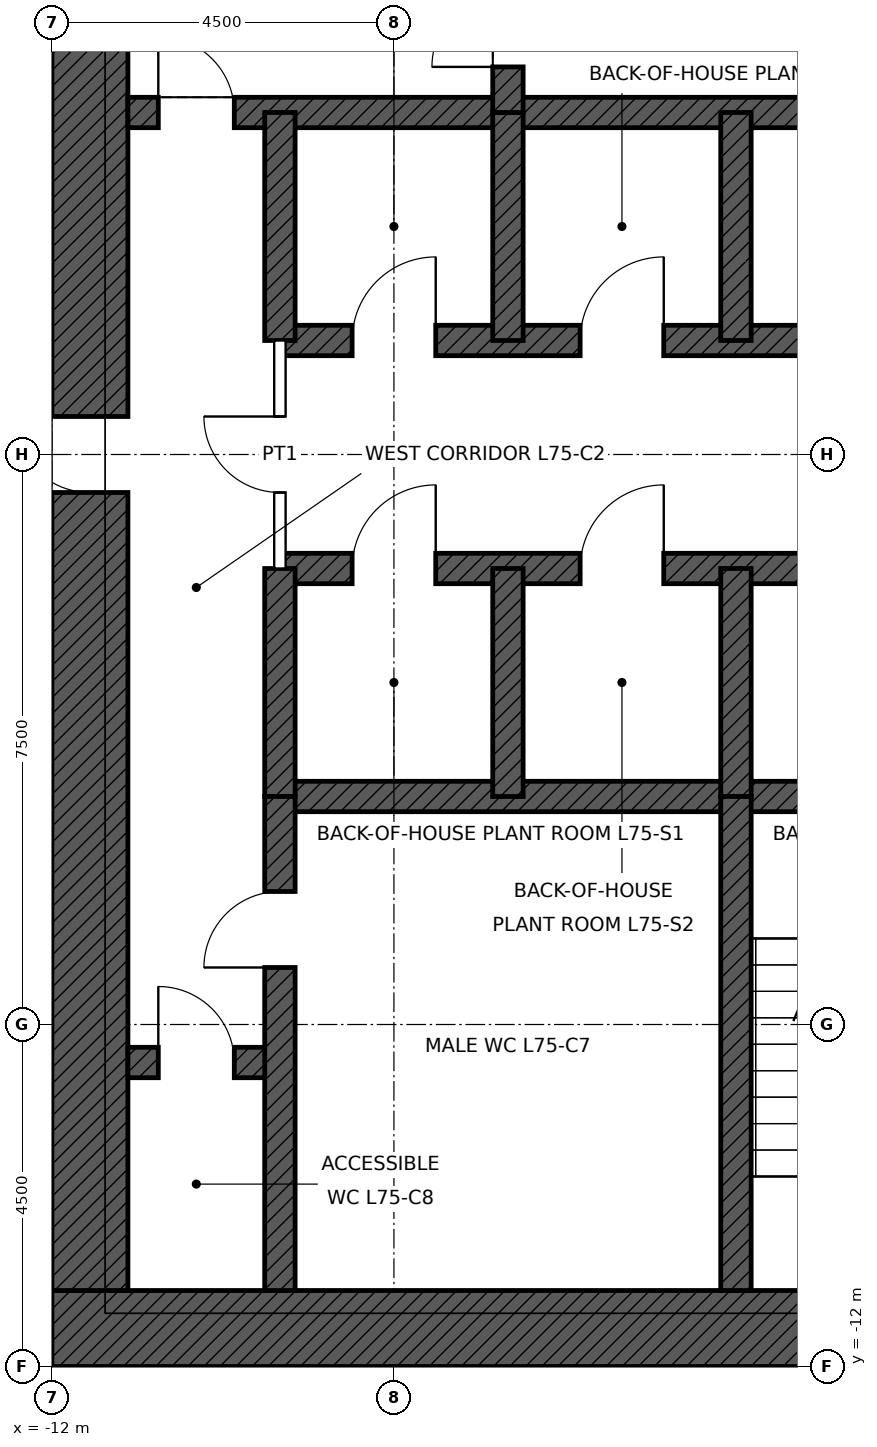
"""IFC4 building model, lengths in metres.
Left out: names, types, materials, properties, quantities, classifications, styles, units other than length and angle.
Written with IfcOpenShell. Run it as: python <this file> out.ifc"""

import sys

from ifc_helpers import new_model, si_unit, direction, frame, frame_2d, origin, place, context, subcontext, project, spatial, rectangle, extrude, element, fill, save


model = new_model("IFC4")
c1 = context("Model", 3, precision=1e-05, world=origin(), true_north=direction((0.0, 1.0)))
c2 = subcontext(c1, "Body", "Model", "MODEL_VIEW")
j1 = project(units=[si_unit("LENGTHUNIT", "METRE"), si_unit("PLANEANGLEUNIT", "RADIAN")], contexts=[c1])
p1 = place(None, origin())
s1 = spatial("IfcSite", under=j1, at=p1, CompositionType="ELEMENT")
p2 = place(p1, origin())
s2 = spatial("IfcBuilding", under=s1, at=p2, CompositionType="ELEMENT")
p3 = place(p2, frame((0.0, 0.0, 335.9)))
s3 = spatial("IfcBuildingStorey", under=s2, at=p3, CompositionType="ELEMENT", Elevation=335.9)
p4 = place(p3, frame((12.0, -11.5, 0.0), z_axis=(0.0, 0.0, 1.0), x_axis=(-1.0, 0.0, 0.0)))
e1 = element("IfcWall", 1, at=p4, inside=s3, PredefinedType="SHEAR", context=c2, shape_type="SweptSolid", body=[
    extrude(rectangle(XDim=24.0, YDim=1.0, at=frame_2d((12.0, 0.0))), origin(), (0.0, 0.0, 1.0), 6.0),
])
p5 = place(p4, frame((11.5, 0.0, 0.0)))
e2 = element("IfcOpeningElement", 2, at=p5, cuts=e1, PredefinedType="OPENING", context=c2, shape_type="SweptSolid", body=[
    extrude(rectangle(XDim=1.0, YDim=2.1, at=frame_2d((0.5, 1.05))), frame((0.0, 0.51, 0.0), z_axis=(0.0, -1.0, 0.0), x_axis=(1.0, 0.0, 0.0)), (0.0, 0.0, 1.0), 1.02),
])
p6 = place(p4, frame((1.0, 0.0, 0.0)))
e3 = element("IfcOpeningElement", 3, at=p6, cuts=e1, PredefinedType="OPENING", context=c2, shape_type="SweptSolid", body=[
    extrude(rectangle(XDim=1.0, YDim=2.4, at=frame_2d((0.5, 1.2))), frame((0.0, 0.51, 0.0), z_axis=(0.0, -1.0, 0.0), x_axis=(1.0, 0.0, 0.0)), (0.0, 0.0, 1.0), 1.02),
])
p7 = place(p3, frame((-11.5, -11.0, 0.0), z_axis=(0.0, 0.0, 1.0), x_axis=(0.0, 1.0, 0.0)))
e4 = element("IfcWall", 4, at=p7, inside=s3, PredefinedType="SHEAR", context=c2, shape_type="SweptSolid", body=[
    extrude(rectangle(XDim=22.0, YDim=1.0, at=frame_2d((11.0, 0.0))), origin(), (0.0, 0.0, 1.0), 6.0),
])
p8 = place(p7, frame((10.5, 0.0, 0.0)))
e5 = element("IfcOpeningElement", 5, at=p8, cuts=e4, PredefinedType="OPENING", context=c2, shape_type="SweptSolid", body=[
    extrude(rectangle(XDim=1.0, YDim=2.4, at=frame_2d((0.5, 1.2))), frame((0.0, 0.51, 0.0), z_axis=(0.0, -1.0, 0.0), x_axis=(1.0, 0.0, 0.0)), (0.0, 0.0, 1.0), 1.02),
])
p9 = place(p3, frame((-11.0, 4.5, 0.0), z_axis=(0.0, 0.0, 1.0), x_axis=(1.0, 0.0, 0.0)))
e6 = element("IfcWall", 6, at=p9, inside=s3, PredefinedType="SHEAR", context=c2, shape_type="SweptSolid", body=[
    extrude(rectangle(XDim=22.0, YDim=0.4, at=frame_2d((11.0, 0.0))), origin(), (0.0, 0.0, 1.0), 6.0),
])
p10 = place(p9, frame((0.4, 0.0, 0.0)))
e7 = element("IfcOpeningElement", 7, at=p10, cuts=e6, PredefinedType="OPENING", context=c2, shape_type="SweptSolid", body=[
    extrude(rectangle(XDim=1.0, YDim=2.1, at=frame_2d((0.5, 1.05))), frame((0.0, 0.21, 0.0), z_axis=(0.0, -1.0, 0.0), x_axis=(1.0, 0.0, 0.0)), (0.0, 0.0, 1.0), 0.42),
])
p11 = place(p9, frame((20.6, 0.0, 0.0)))
e8 = element("IfcOpeningElement", 8, at=p11, cuts=e6, PredefinedType="OPENING", context=c2, shape_type="SweptSolid", body=[
    extrude(rectangle(XDim=1.0, YDim=2.1, at=frame_2d((0.5, 1.05))), frame((0.0, 0.21, 0.0), z_axis=(0.0, -1.0, 0.0), x_axis=(1.0, 0.0, 0.0)), (0.0, 0.0, 1.0), 0.42),
])
p12 = place(p3, frame((-9.0, 1.5, 0.0), z_axis=(0.0, 0.0, 1.0), x_axis=(1.0, 0.0, 0.0)))
e9 = element("IfcWall", 9, at=p12, inside=s3, PredefinedType="SHEAR", context=c2, shape_type="SweptSolid", body=[
    extrude(rectangle(XDim=18.0, YDim=0.4, at=frame_2d((9.0, 0.0))), origin(), (0.0, 0.0, 1.0), 6.0),
])
p13 = place(p12, frame((0.95, 0.0, 0.0)))
e10 = element("IfcOpeningElement", 10, at=p13, cuts=e9, PredefinedType="OPENING", context=c2, shape_type="SweptSolid", body=[
    extrude(rectangle(XDim=1.1, YDim=2.1, at=frame_2d((0.55, 1.05))), frame((0.0, 0.21, 0.0), z_axis=(0.0, -1.0, 0.0), x_axis=(1.0, 0.0, 0.0)), (0.0, 0.0, 1.0), 0.42),
])
p14 = place(p12, frame((3.95, 0.0, 0.0)))
e11 = element("IfcOpeningElement", 11, at=p14, cuts=e9, PredefinedType="OPENING", context=c2, shape_type="SweptSolid", body=[
    extrude(rectangle(XDim=1.1, YDim=2.1, at=frame_2d((0.55, 1.05))), frame((0.0, 0.21, 0.0), z_axis=(0.0, -1.0, 0.0), x_axis=(1.0, 0.0, 0.0)), (0.0, 0.0, 1.0), 0.42),
])
p15 = place(p12, frame((6.95, 0.0, 0.0)))
e12 = element("IfcOpeningElement", 12, at=p15, cuts=e9, PredefinedType="OPENING", context=c2, shape_type="SweptSolid", body=[
    extrude(rectangle(XDim=1.1, YDim=2.1, at=frame_2d((0.55, 1.05))), frame((0.0, 0.21, 0.0), z_axis=(0.0, -1.0, 0.0), x_axis=(1.0, 0.0, 0.0)), (0.0, 0.0, 1.0), 0.42),
])
p16 = place(p12, frame((9.95, 0.0, 0.0)))
e13 = element("IfcOpeningElement", 13, at=p16, cuts=e9, PredefinedType="OPENING", context=c2, shape_type="SweptSolid", body=[
    extrude(rectangle(XDim=1.1, YDim=2.1, at=frame_2d((0.55, 1.05))), frame((0.0, 0.21, 0.0), z_axis=(0.0, -1.0, 0.0), x_axis=(1.0, 0.0, 0.0)), (0.0, 0.0, 1.0), 0.42),
])
p17 = place(p12, frame((12.95, 0.0, 0.0)))
e14 = element("IfcOpeningElement", 14, at=p17, cuts=e9, PredefinedType="OPENING", context=c2, shape_type="SweptSolid", body=[
    extrude(rectangle(XDim=1.1, YDim=2.1, at=frame_2d((0.55, 1.05))), frame((0.0, 0.21, 0.0), z_axis=(0.0, -1.0, 0.0), x_axis=(1.0, 0.0, 0.0)), (0.0, 0.0, 1.0), 0.42),
])
p18 = place(p12, frame((15.95, 0.0, 0.0)))
e15 = element("IfcOpeningElement", 15, at=p18, cuts=e9, PredefinedType="OPENING", context=c2, shape_type="SweptSolid", body=[
    extrude(rectangle(XDim=1.1, YDim=2.1, at=frame_2d((0.55, 1.05))), frame((0.0, 0.21, 0.0), z_axis=(0.0, -1.0, 0.0), x_axis=(1.0, 0.0, 0.0)), (0.0, 0.0, 1.0), 0.42),
])
p19 = place(p3, frame((-9.0, -1.5, 0.0), z_axis=(0.0, 0.0, 1.0), x_axis=(1.0, 0.0, 0.0)))
e16 = element("IfcWall", 16, at=p19, inside=s3, PredefinedType="SHEAR", context=c2, shape_type="SweptSolid", body=[
    extrude(rectangle(XDim=18.0, YDim=0.4, at=frame_2d((9.0, 0.0))), origin(), (0.0, 0.0, 1.0), 6.0),
])
p20 = place(p19, frame((0.95, 0.0, 0.0)))
e17 = element("IfcOpeningElement", 17, at=p20, cuts=e16, PredefinedType="OPENING", context=c2, shape_type="SweptSolid", body=[
    extrude(rectangle(XDim=1.1, YDim=2.1, at=frame_2d((0.55, 1.05))), frame((0.0, 0.21, 0.0), z_axis=(0.0, -1.0, 0.0), x_axis=(1.0, 0.0, 0.0)), (0.0, 0.0, 1.0), 0.42),
])
p21 = place(p19, frame((3.95, 0.0, 0.0)))
e18 = element("IfcOpeningElement", 18, at=p21, cuts=e16, PredefinedType="OPENING", context=c2, shape_type="SweptSolid", body=[
    extrude(rectangle(XDim=1.1, YDim=2.1, at=frame_2d((0.55, 1.05))), frame((0.0, 0.21, 0.0), z_axis=(0.0, -1.0, 0.0), x_axis=(1.0, 0.0, 0.0)), (0.0, 0.0, 1.0), 0.42),
])
p22 = place(p19, frame((6.95, 0.0, 0.0)))
e19 = element("IfcOpeningElement", 19, at=p22, cuts=e16, PredefinedType="OPENING", context=c2, shape_type="SweptSolid", body=[
    extrude(rectangle(XDim=1.1, YDim=2.1, at=frame_2d((0.55, 1.05))), frame((0.0, 0.21, 0.0), z_axis=(0.0, -1.0, 0.0), x_axis=(1.0, 0.0, 0.0)), (0.0, 0.0, 1.0), 0.42),
])
p23 = place(p3, frame((-9.0, -4.5, 0.0), z_axis=(0.0, 0.0, 1.0), x_axis=(1.0, 0.0, 0.0)))
e20 = element("IfcWall", 20, at=p23, inside=s3, PredefinedType="SHEAR", context=c2, shape_type="SweptSolid", body=[
    extrude(rectangle(XDim=18.0, YDim=0.4, at=frame_2d((9.0, 0.0))), origin(), (0.0, 0.0, 1.0), 6.0),
])
p24 = place(p3, frame((-11.0, -8.0, 0.0), z_axis=(0.0, 0.0, 1.0), x_axis=(1.0, 0.0, 0.0)))
e21 = element("IfcWall", 21, at=p24, inside=s3, PredefinedType="SHEAR", context=c2, shape_type="SweptSolid", body=[
    extrude(rectangle(XDim=2.0, YDim=0.4, at=frame_2d((1.0, 0.0))), origin(), (0.0, 0.0, 1.0), 6.0),
])
p25 = place(p24, frame((0.4, 0.0, 0.0)))
e22 = element("IfcOpeningElement", 22, at=p25, cuts=e21, PredefinedType="OPENING", context=c2, shape_type="SweptSolid", body=[
    extrude(rectangle(XDim=1.0, YDim=2.1, at=frame_2d((0.5, 1.05))), frame((0.0, 0.21, 0.0), z_axis=(0.0, -1.0, 0.0), x_axis=(1.0, 0.0, 0.0)), (0.0, 0.0, 1.0), 0.42),
])
for number, where, z_axis, x_axis in (
    (23, (-9.0, 1.5, 0.0), (0.0, 0.0, 1.0), (0.0, 1.0, 0.0)),
    (24, (-9.0, -4.5, 0.0), (0.0, 0.0, 1.0), (0.0, 1.0, 0.0)),
    (25, (-6.0, 1.5, 0.0), (0.0, 0.0, 1.0), (0.0, 1.0, 0.0)),
    (26, (-3.0, 1.5, 0.0), (0.0, 0.0, 1.0), (0.0, 1.0, 0.0)),
    (27, (-6.0, -4.5, 0.0), (0.0, 0.0, 1.0), (0.0, 1.0, 0.0)),
    (28, (-3.0, -4.5, 0.0), (0.0, 0.0, 1.0), (0.0, 1.0, 0.0)),
):
    element("IfcWall", number, at=place(p3, frame(where, z_axis=z_axis, x_axis=x_axis)), inside=s3, PredefinedType="SHEAR", context=c2, shape_type="SweptSolid", body=[
        extrude(rectangle(XDim=3.0, YDim=0.4, at=frame_2d((1.5, 0.0))), origin(), (0.0, 0.0, 1.0), 6.0),
    ])
p26 = place(p3, frame((-6.0, 4.5, 0.0), z_axis=(0.0, 0.0, 1.0), x_axis=(0.0, 1.0, 0.0)))
e29 = element("IfcWall", 29, at=p26, inside=s3, PredefinedType="SHEAR", context=c2, shape_type="SweptSolid", body=[
    extrude(rectangle(XDim=6.5, YDim=0.4, at=frame_2d((3.25, 0.0))), origin(), (0.0, 0.0, 1.0), 6.0),
])
p27 = place(p26, frame((0.6, 0.0, 0.0)))
e30 = element("IfcOpeningElement", 30, at=p27, cuts=e29, PredefinedType="OPENING", context=c2, shape_type="SweptSolid", body=[
    extrude(rectangle(XDim=1.0, YDim=2.1, at=frame_2d((0.5, 1.05))), frame((0.0, 0.21, 0.0), z_axis=(0.0, -1.0, 0.0), x_axis=(1.0, 0.0, 0.0)), (0.0, 0.0, 1.0), 0.42),
])
p28 = place(p3, frame((-9.0, -11.0, 0.0), z_axis=(0.0, 0.0, 1.0), x_axis=(0.0, 1.0, 0.0)))
e31 = element("IfcWall", 31, at=p28, inside=s3, PredefinedType="SHEAR", context=c2, shape_type="SweptSolid", body=[
    extrude(rectangle(XDim=6.5, YDim=0.4, at=frame_2d((3.25, 0.0))), origin(), (0.0, 0.0, 1.0), 6.0),
])
p29 = place(p28, frame((4.25, 0.0, 0.0)))
e32 = element("IfcOpeningElement", 32, at=p29, cuts=e31, PredefinedType="OPENING", context=c2, shape_type="SweptSolid", body=[
    extrude(rectangle(XDim=1.0, YDim=2.1, at=frame_2d((0.5, 1.05))), frame((0.0, 0.21, 0.0), z_axis=(0.0, -1.0, 0.0), x_axis=(1.0, 0.0, 0.0)), (0.0, 0.0, 1.0), 0.42),
])
p30 = place(p3, frame((-3.0, -11.0, 0.0), z_axis=(0.0, 0.0, 1.0), x_axis=(0.0, 1.0, 0.0)))
e33 = element("IfcWall", 33, at=p30, inside=s3, PredefinedType="SHEAR", context=c2, shape_type="SweptSolid", body=[
    extrude(rectangle(XDim=6.5, YDim=0.4, at=frame_2d((3.25, 0.0))), origin(), (0.0, 0.0, 1.0), 6.0),
])
p31 = place(p3, frame((-9.0, -1.5, 0.0), z_axis=(0.0, 0.0, 1.0), x_axis=(0.0, 1.0, 0.0)))
e34 = element("IfcWall", 34, at=p31, inside=s3, PredefinedType="PARTITIONING", context=c2, shape_type="SweptSolid", body=[
    extrude(rectangle(XDim=3.0, YDim=0.15, at=frame_2d((1.5, 0.0))), origin(), (0.0, 0.0, 1.0), 5.75),
])
p32 = place(p31, frame((1.0, 0.0, 0.0)))
e35 = element("IfcOpeningElement", 35, at=p32, cuts=e34, PredefinedType="OPENING", context=c2, shape_type="SweptSolid", body=[
    extrude(rectangle(XDim=1.0, YDim=2.4, at=frame_2d((0.5, 1.2))), frame((0.0, 0.085, 0.0), z_axis=(0.0, -1.0, 0.0), x_axis=(1.0, 0.0, 0.0)), (0.0, 0.0, 1.0), 0.17),
])
p33 = place(p10, origin())
e36 = element("IfcDoor", 36, at=p33, inside=s3, OperationType="SINGLE_SWING_LEFT", PredefinedType="DOOR", context=c2, shape_type="SweptSolid", body=[
    extrude(rectangle(XDim=1.0, YDim=2.1, at=frame_2d((0.5, 1.05))), frame((0.0, 0.025, 0.0), z_axis=(0.0, -1.0, 0.0), x_axis=(1.0, 0.0, 0.0)), (0.0, 0.0, 1.0), 0.05),
])
fill(e7, e36)
p34 = place(p27, origin())
e37 = element("IfcDoor", 37, at=p34, inside=s3, OperationType="SINGLE_SWING_LEFT", PredefinedType="DOOR", context=c2, shape_type="SweptSolid", body=[
    extrude(rectangle(XDim=1.0, YDim=2.1, at=frame_2d((0.5, 1.05))), frame((0.0, 0.025, 0.0), z_axis=(0.0, -1.0, 0.0), x_axis=(1.0, 0.0, 0.0)), (0.0, 0.0, 1.0), 0.05),
])
fill(e30, e37)
p35 = place(p8, origin())
e38 = element("IfcDoor", 38, at=p35, inside=s3, OperationType="SINGLE_SWING_RIGHT", PredefinedType="DOOR", context=c2, shape_type="SweptSolid", body=[
    extrude(rectangle(XDim=1.0, YDim=2.4, at=frame_2d((0.5, 1.2))), frame((0.0, 0.485, 0.0), z_axis=(0.0, -1.0, 0.0), x_axis=(1.0, 0.0, 0.0)), (0.0, 0.0, 1.0), 0.05),
])
fill(e5, e38)
p36 = place(p29, origin())
e39 = element("IfcDoor", 39, at=p36, inside=s3, OperationType="SINGLE_SWING_LEFT", PredefinedType="DOOR", context=c2, shape_type="SweptSolid", body=[
    extrude(rectangle(XDim=1.0, YDim=2.1, at=frame_2d((0.5, 1.05))), frame((0.0, 0.025, 0.0), z_axis=(0.0, -1.0, 0.0), x_axis=(1.0, 0.0, 0.0)), (0.0, 0.0, 1.0), 0.05),
])
fill(e32, e39)
p37 = place(p25, origin())
e40 = element("IfcDoor", 40, at=p37, inside=s3, OperationType="SINGLE_SWING_LEFT", PredefinedType="DOOR", context=c2, shape_type="SweptSolid", body=[
    extrude(rectangle(XDim=1.0, YDim=2.1, at=frame_2d((0.5, 1.05))), frame((0.0, 0.025, 0.0), z_axis=(0.0, -1.0, 0.0), x_axis=(1.0, 0.0, 0.0)), (0.0, 0.0, 1.0), 0.05),
])
fill(e22, e40)
p38 = place(p32, origin())
e41 = element("IfcDoor", 41, at=p38, inside=s3, OperationType="SINGLE_SWING_RIGHT", PredefinedType="DOOR", context=c2, shape_type="SweptSolid", body=[
    extrude(rectangle(XDim=1.0, YDim=2.4, at=frame_2d((0.5, 1.2))), frame((0.0, 0.025, 0.0), z_axis=(0.0, -1.0, 0.0), x_axis=(1.0, 0.0, 0.0)), (0.0, 0.0, 1.0), 0.05),
])
fill(e35, e41)
p39 = place(p13, origin())
e42 = element("IfcDoor", 42, at=p39, inside=s3, OperationType="SINGLE_SWING_RIGHT", PredefinedType="DOOR", context=c2, shape_type="SweptSolid", body=[
    extrude(rectangle(XDim=1.1, YDim=2.1, at=frame_2d((0.55, 1.05))), frame((0.0, 0.025, 0.0), z_axis=(0.0, -1.0, 0.0), x_axis=(1.0, 0.0, 0.0)), (0.0, 0.0, 1.0), 0.05),
])
fill(e10, e42)
p40 = place(p14, origin())
e43 = element("IfcDoor", 43, at=p40, inside=s3, OperationType="SINGLE_SWING_RIGHT", PredefinedType="DOOR", context=c2, shape_type="SweptSolid", body=[
    extrude(rectangle(XDim=1.1, YDim=2.1, at=frame_2d((0.55, 1.05))), frame((0.0, 0.025, 0.0), z_axis=(0.0, -1.0, 0.0), x_axis=(1.0, 0.0, 0.0)), (0.0, 0.0, 1.0), 0.05),
])
fill(e11, e43)
p41 = place(p20, origin())
e44 = element("IfcDoor", 44, at=p41, inside=s3, OperationType="SINGLE_SWING_RIGHT", PredefinedType="DOOR", context=c2, shape_type="SweptSolid", body=[
    extrude(rectangle(XDim=1.1, YDim=2.1, at=frame_2d((0.55, 1.05))), frame((0.0, 0.025, 0.0), z_axis=(0.0, -1.0, 0.0), x_axis=(1.0, 0.0, 0.0)), (0.0, 0.0, 1.0), 0.05),
])
fill(e17, e44)
p42 = place(p21, origin())
e45 = element("IfcDoor", 45, at=p42, inside=s3, OperationType="SINGLE_SWING_RIGHT", PredefinedType="DOOR", context=c2, shape_type="SweptSolid", body=[
    extrude(rectangle(XDim=1.1, YDim=2.1, at=frame_2d((0.55, 1.05))), frame((0.0, 0.025, 0.0), z_axis=(0.0, -1.0, 0.0), x_axis=(1.0, 0.0, 0.0)), (0.0, 0.0, 1.0), 0.05),
])
fill(e18, e45)
save(model, sys.argv[1])
